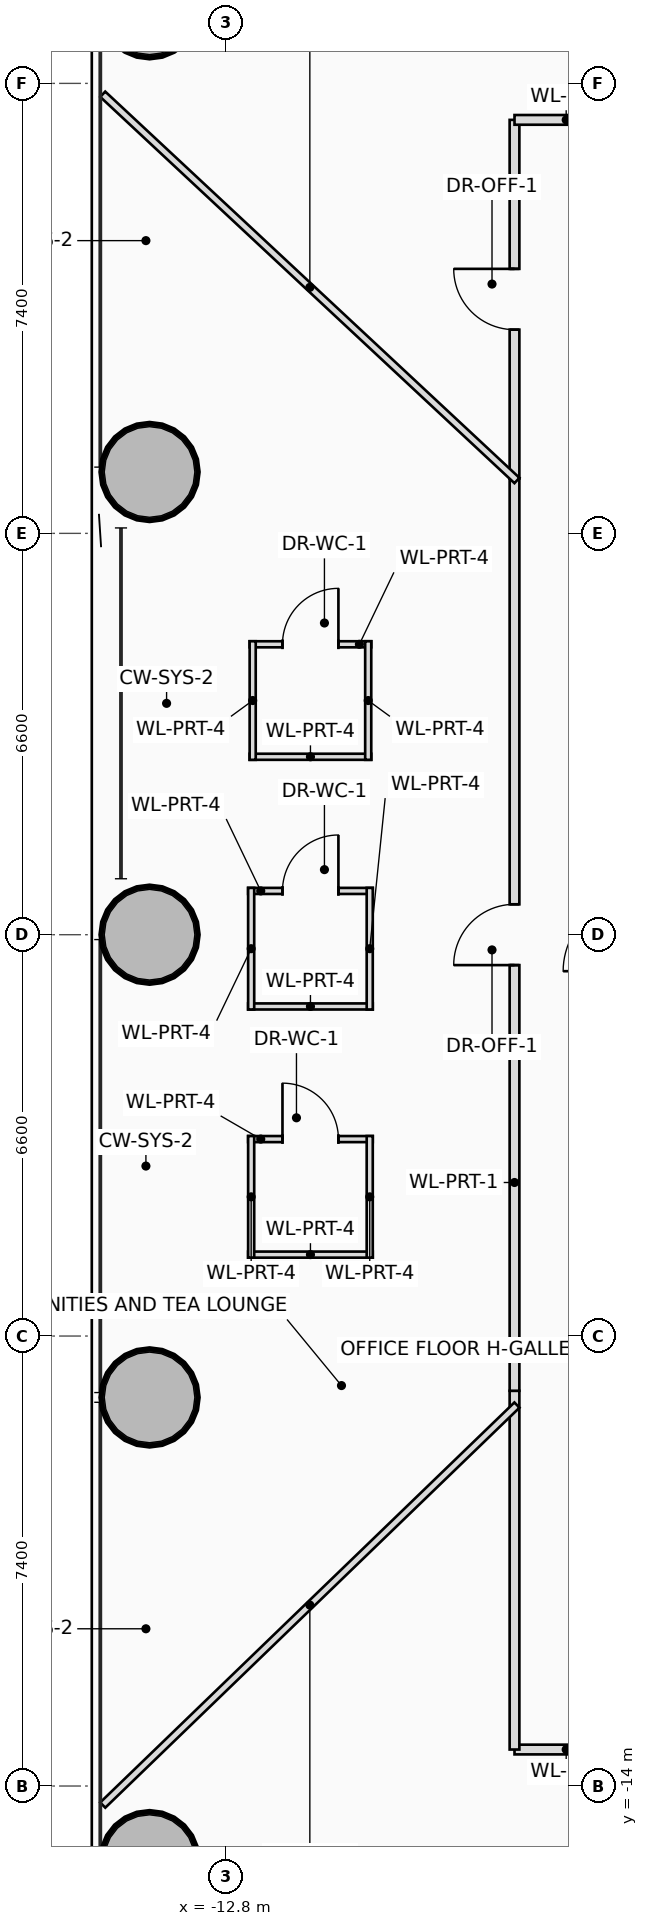
"""IFC4 building model, lengths in metres.
Left out: names, types, materials, properties, quantities, classifications, styles, units other than length and angle.
Written with IfcOpenShell. Run it as: python <this file> out.ifc"""

import sys

from ifc_helpers import new_model, si_unit, direction, frame, frame_2d, origin, origin_2d, place, context, subcontext, project, spatial, rectangle, hollow_circle, extrude, source, transform, mapped, element, fill, save


model = new_model("IFC4")
c1 = context("Model", 3, precision=1e-05, world=origin(), true_north=direction((0.0, 1.0)))
c2 = subcontext(c1, "Body", "Model", "MODEL_VIEW")
j1 = project(units=[si_unit("LENGTHUNIT", "METRE"), si_unit("PLANEANGLEUNIT", "RADIAN")], contexts=[c1])
p1 = place(None, origin())
s1 = spatial("IfcSite", under=j1, at=p1, CompositionType="ELEMENT")
p2 = place(p1, origin())
s2 = spatial("IfcBuilding", under=s1, at=p2, CompositionType="ELEMENT")
p3 = place(p2, frame((0.0, 0.0, 23.8)))
s3 = spatial("IfcBuildingStorey", under=s2, at=p3, CompositionType="ELEMENT", Elevation=23.8)
m1 = source(origin(), c2, "Body", "SweptSolid", [
    extrude(hollow_circle(Radius=0.8, WallThickness=0.055, at=origin_2d()), origin(), (0.0, 0.0, 1.0), 3.7),
])
for number, where, z_axis, x_axis in (
    (1, (-14.052, 15.219, 0.0), (0.0, 0.0, 1.0), (1.0, 0.0, 0.0)),
    (2, (-14.052, 7.61, 0.0), (0.0, 0.0, 1.0), (1.0, 0.0, 0.0)),
    (3, (-14.052, 0.0, 0.0), (0.0, 0.0, 1.0), (1.0, 0.0, 0.0)),
    (4, (-14.052, -7.61, 0.0), (0.0, 0.0, 1.0), (1.0, 0.0, 0.0)),
    (5, (-14.052, -15.219, 0.0), (0.0, 0.0, 1.0), (1.0, 0.0, 0.0)),
):
    element("IfcColumn", number, at=place(p3, frame(where, z_axis=z_axis, x_axis=x_axis)), inside=s3, PredefinedType="COLUMN", context=c2, shape_type="MappedRepresentation", body=[
        mapped(m1, transform((0.0, 0.0, 0.0), scale=1.0)),
    ])
p4 = place(p3, frame((-12.431, 0.72, 0.0), z_axis=(0.0, 0.0, 1.0), x_axis=(1.0, 0.0, 0.0)))
e6 = element("IfcWall", 6, at=p4, inside=s3, PredefinedType="PARTITIONING", context=c2, shape_type="SweptSolid", body=[
    extrude(rectangle(XDim=2.05, YDim=0.1, at=frame_2d((1.025, 0.0))), origin(), (0.0, 0.0, 1.0), 3.15),
])
p5 = place(p4, frame((0.565, 0.0, 0.0)))
e7 = element("IfcOpeningElement", 7, at=p5, cuts=e6, PredefinedType="OPENING", context=c2, shape_type="SweptSolid", body=[
    extrude(rectangle(XDim=0.92, YDim=2.1, at=frame_2d((0.46, 1.05))), frame((0.0, 0.06, 0.0), z_axis=(0.0, -1.0, 0.0), x_axis=(1.0, 0.0, 0.0)), (0.0, 0.0, 1.0), 0.12),
])
p6 = place(p3, frame((-10.381, -1.18, 0.0), z_axis=(0.0, 0.0, 1.0), x_axis=(-1.0, 0.0, 0.0)))
e8 = element("IfcWall", 8, at=p6, inside=s3, PredefinedType="PARTITIONING", context=c2, shape_type="SweptSolid", body=[
    extrude(rectangle(XDim=2.05, YDim=0.1, at=frame_2d((1.025, 0.0))), origin(), (0.0, 0.0, 1.0), 2.8),
])
p7 = place(p3, frame((-10.431, 0.77, 0.0), z_axis=(0.0, 0.0, 1.0), x_axis=(0.0, -1.0, 0.0)))
e9 = element("IfcWall", 9, at=p7, inside=s3, PredefinedType="PARTITIONING", context=c2, shape_type="SweptSolid", body=[
    extrude(rectangle(XDim=2.0, YDim=0.1, at=frame_2d((1.0, 0.0))), origin(), (0.0, 0.0, 1.0), 3.495),
])
p8 = place(p3, frame((-12.381, -1.23, 0.0), z_axis=(0.0, 0.0, 1.0), x_axis=(0.0, 1.0, 0.0)))
e10 = element("IfcWall", 10, at=p8, inside=s3, PredefinedType="PARTITIONING", context=c2, shape_type="SweptSolid", body=[
    extrude(rectangle(XDim=2.0, YDim=0.1, at=frame_2d((1.0, 0.0))), origin(), (0.0, 0.0, 1.0), 2.8),
])
p9 = place(p3, frame((-12.431, -3.361, 0.0), z_axis=(0.0, 0.0, 1.0), x_axis=(1.0, 0.0, 0.0)))
e11 = element("IfcWall", 11, at=p9, inside=s3, PredefinedType="PARTITIONING", context=c2, shape_type="SweptSolid", body=[
    extrude(rectangle(XDim=2.05, YDim=0.1, at=frame_2d((1.025, 0.0))), origin(), (0.0, 0.0, 1.0), 3.15),
])
p10 = place(p9, frame((0.565, 0.0, 0.0)))
e12 = element("IfcOpeningElement", 12, at=p10, cuts=e11, PredefinedType="OPENING", context=c2, shape_type="SweptSolid", body=[
    extrude(rectangle(XDim=0.92, YDim=2.1, at=frame_2d((0.46, 1.05))), frame((0.0, 0.06, 0.0), z_axis=(0.0, -1.0, 0.0), x_axis=(1.0, 0.0, 0.0)), (0.0, 0.0, 1.0), 0.12),
])
p11 = place(p3, frame((-10.381, -5.261, 0.0), z_axis=(0.0, 0.0, 1.0), x_axis=(-1.0, 0.0, 0.0)))
e13 = element("IfcWall", 13, at=p11, inside=s3, PredefinedType="PARTITIONING", context=c2, shape_type="SweptSolid", body=[
    extrude(rectangle(XDim=2.05, YDim=0.1, at=frame_2d((1.025, 0.0))), origin(), (0.0, 0.0, 1.0), 3.15),
])
for number, where, z_axis, x_axis in (
    (14, (-10.431, -3.311, 0.0), (0.0, 0.0, 1.0), (0.0, -1.0, 0.0)),
    (15, (-12.381, -5.311, 0.0), (0.0, 0.0, 1.0), (0.0, 1.0, 0.0)),
):
    element("IfcWall", number, at=place(p3, frame(where, z_axis=z_axis, x_axis=x_axis)), inside=s3, PredefinedType="PARTITIONING", context=c2, shape_type="SweptSolid", body=[
        extrude(rectangle(XDim=2.0, YDim=0.1, at=frame_2d((1.0, 0.0))), origin(), (0.0, 0.0, 1.0), 3.495),
    ])
p12 = place(p3, frame((-12.406, 4.776, 0.0), z_axis=(0.0, 0.0, 1.0), x_axis=(1.0, 0.0, 0.0)))
e16 = element("IfcWall", 16, at=p12, inside=s3, PredefinedType="PARTITIONING", context=c2, shape_type="SweptSolid", body=[
    extrude(rectangle(XDim=2.0, YDim=0.1, at=frame_2d((1.0, 0.0))), origin(), (0.0, 0.0, 1.0), 3.15),
])
p13 = place(p12, frame((0.54, 0.0, 0.0)))
e17 = element("IfcOpeningElement", 17, at=p13, cuts=e16, PredefinedType="OPENING", context=c2, shape_type="SweptSolid", body=[
    extrude(rectangle(XDim=0.92, YDim=2.1, at=frame_2d((0.46, 1.05))), frame((0.0, 0.06, 0.0), z_axis=(0.0, -1.0, 0.0), x_axis=(1.0, 0.0, 0.0)), (0.0, 0.0, 1.0), 0.12),
])
p14 = place(p3, frame((-10.406, 2.926, 0.0), z_axis=(0.0, 0.0, 1.0), x_axis=(-1.0, 0.0, 0.0)))
e18 = element("IfcWall", 18, at=p14, inside=s3, PredefinedType="PARTITIONING", context=c2, shape_type="SweptSolid", body=[
    extrude(rectangle(XDim=2.0, YDim=0.1, at=frame_2d((1.0, 0.0))), origin(), (0.0, 0.0, 1.0), 3.15),
])
for number, where, z_axis, x_axis in (
    (19, (-10.456, 4.826, 0.0), (0.0, 0.0, 1.0), (0.0, -1.0, 0.0)),
    (20, (-12.356, 2.876, 0.0), (0.0, 0.0, 1.0), (0.0, 1.0, 0.0)),
):
    element("IfcWall", number, at=place(p3, frame(where, z_axis=z_axis, x_axis=x_axis)), inside=s3, PredefinedType="PARTITIONING", context=c2, shape_type="SweptSolid", body=[
        extrude(rectangle(XDim=1.95, YDim=0.1, at=frame_2d((0.975, 0.0))), origin(), (0.0, 0.0, 1.0), 3.495),
    ])
p15 = place(p3, frame((-6.35, -13.4, 0.0), z_axis=(0.0, 0.0, 1.0), x_axis=(-1.0, 0.0, 0.0)))
e21 = element("IfcWall", 21, at=p15, inside=s3, PredefinedType="PARTITIONING", context=c2, shape_type="SweptSolid", body=[
    extrude(rectangle(XDim=1.7, YDim=0.16, at=frame_2d((0.85, 0.0))), origin(), (0.0, 0.0, 1.0), 2.8),
])
p16 = place(p3, frame((-8.05, -13.4, 0.0), z_axis=(0.0, 0.0, 1.0), x_axis=(0.0, 1.0, 0.0)))
e22 = element("IfcWall", 22, at=p16, inside=s3, PredefinedType="PARTITIONING", context=c2, shape_type="SweptSolid", body=[
    extrude(rectangle(XDim=5.9, YDim=0.16, at=frame_2d((2.95, 0.0))), origin(), (0.0, 0.0, 1.0), 2.8),
])
p17 = place(p3, frame((-8.05, -7.5, 0.0), z_axis=(0.0, 0.0, 1.0), x_axis=(0.0, 1.0, 0.0)))
e23 = element("IfcWall", 23, at=p17, inside=s3, PredefinedType="PARTITIONING", context=c2, shape_type="SweptSolid", body=[
    extrude(rectangle(XDim=15.0, YDim=0.16, at=frame_2d((7.5, 0.0))), origin(), (0.0, 0.0, 1.0), 2.8),
])
p18 = place(p17, frame((7.0, 0.0, 0.0)))
e24 = element("IfcOpeningElement", 24, at=p18, cuts=e23, PredefinedType="OPENING", context=c2, shape_type="SweptSolid", body=[
    extrude(rectangle(XDim=1.0, YDim=2.25, at=frame_2d((0.5, 1.125))), frame((0.0, 0.09, 0.0), z_axis=(0.0, -1.0, 0.0), x_axis=(1.0, 0.0, 0.0)), (0.0, 0.0, 1.0), 0.18),
])
p19 = place(p3, frame((-8.05, 7.5, 0.0), z_axis=(0.0, 0.0, 1.0), x_axis=(0.0, 1.0, 0.0)))
e25 = element("IfcWall", 25, at=p19, inside=s3, PredefinedType="PARTITIONING", context=c2, shape_type="SweptSolid", body=[
    extrude(rectangle(XDim=5.9, YDim=0.16, at=frame_2d((2.95, 0.0))), origin(), (0.0, 0.0, 1.0), 2.8),
])
p20 = place(p19, frame((2.45, 0.0, 0.0)))
e26 = element("IfcOpeningElement", 26, at=p20, cuts=e25, PredefinedType="OPENING", context=c2, shape_type="SweptSolid", body=[
    extrude(rectangle(XDim=1.0, YDim=2.25, at=frame_2d((0.5, 1.125))), frame((0.0, 0.09, 0.0), z_axis=(0.0, -1.0, 0.0), x_axis=(1.0, 0.0, 0.0)), (0.0, 0.0, 1.0), 0.18),
])
p21 = place(p3, frame((-8.05, 13.4, 0.0), z_axis=(0.0, 0.0, 1.0), x_axis=(1.0, 0.0, 0.0)))
e27 = element("IfcWall", 27, at=p21, inside=s3, PredefinedType="PARTITIONING", context=c2, shape_type="SweptSolid", body=[
    extrude(rectangle(XDim=1.7, YDim=0.16, at=frame_2d((0.85, 0.0))), origin(), (0.0, 0.0, 1.0), 2.8),
])
p22 = place(p3, frame((-8.01, 7.469, 0.0), z_axis=(0.0, 0.0, 1.0), x_axis=(-0.731354171407, 0.681997856277, 0.0)))
e28 = element("IfcWall", 28, at=p22, inside=s3, PredefinedType="PARTITIONING", context=c2, shape_type="SweptSolid", body=[
    extrude(rectangle(XDim=9.314, YDim=0.12, at=frame_2d((4.657, 0.0))), origin(), (0.0, 0.0, 1.0), 2.96),
])
p23 = place(p3, frame((-8.01, -7.735, 0.0), z_axis=(0.0, 0.0, 1.0), x_axis=(-0.719335268178, -0.694663063618, 0.0)))
e29 = element("IfcWall", 29, at=p23, inside=s3, PredefinedType="PARTITIONING", context=c2, shape_type="SweptSolid", body=[
    extrude(rectangle(XDim=9.47, YDim=0.12, at=frame_2d((4.735, 0.0))), origin(), (0.0, 0.0, 1.0), 2.8),
])
p24 = place(p5, origin())
e30 = element("IfcDoor", 30, at=p24, inside=s3, OperationType="SINGLE_SWING_RIGHT", PredefinedType="DOOR", context=c2, shape_type="SweptSolid", body=[
    extrude(rectangle(XDim=0.92, YDim=2.1, at=frame_2d((0.46, 1.05))), frame((0.0, 0.025, 0.0), z_axis=(0.0, -1.0, 0.0), x_axis=(1.0, 0.0, 0.0)), (0.0, 0.0, 1.0), 0.05),
])
fill(e7, e30)
p25 = place(p10, origin())
e31 = element("IfcDoor", 31, at=p25, inside=s3, OperationType="SINGLE_SWING_LEFT", PredefinedType="DOOR", context=c2, shape_type="SweptSolid", body=[
    extrude(rectangle(XDim=0.92, YDim=2.1, at=frame_2d((0.46, 1.05))), frame((0.0, 0.025, 0.0), z_axis=(0.0, -1.0, 0.0), x_axis=(1.0, 0.0, 0.0)), (0.0, 0.0, 1.0), 0.05),
])
fill(e12, e31)
p26 = place(p13, origin())
e32 = element("IfcDoor", 32, at=p26, inside=s3, OperationType="SINGLE_SWING_RIGHT", PredefinedType="DOOR", context=c2, shape_type="SweptSolid", body=[
    extrude(rectangle(XDim=0.92, YDim=2.1, at=frame_2d((0.46, 1.05))), frame((0.0, 0.025, 0.0), z_axis=(0.0, -1.0, 0.0), x_axis=(1.0, 0.0, 0.0)), (0.0, 0.0, 1.0), 0.05),
])
fill(e17, e32)
p27 = place(p18, origin())
e33 = element("IfcDoor", 33, at=p27, inside=s3, OperationType="SINGLE_SWING_LEFT", PredefinedType="DOOR", context=c2, shape_type="SweptSolid", body=[
    extrude(rectangle(XDim=1.0, YDim=2.25, at=frame_2d((0.5, 1.125))), frame((0.0, 0.025, 0.0), z_axis=(0.0, -1.0, 0.0), x_axis=(1.0, 0.0, 0.0)), (0.0, 0.0, 1.0), 0.05),
])
fill(e24, e33)
p28 = place(p20, origin())
e34 = element("IfcDoor", 34, at=p28, inside=s3, OperationType="SINGLE_SWING_RIGHT", PredefinedType="DOOR", context=c2, shape_type="SweptSolid", body=[
    extrude(rectangle(XDim=1.0, YDim=2.25, at=frame_2d((0.5, 1.125))), frame((0.0, 0.025, 0.0), z_axis=(0.0, -1.0, 0.0), x_axis=(1.0, 0.0, 0.0)), (0.0, 0.0, 1.0), 0.05),
])
fill(e26, e34)
save(model, sys.argv[1])
